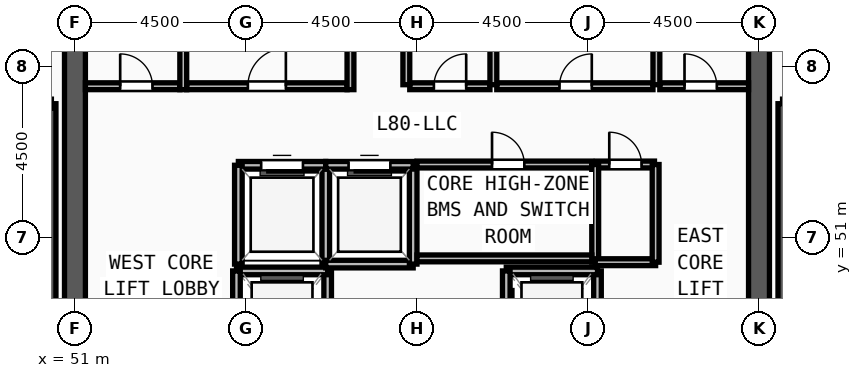
"""IFC4 building model, lengths in metres.
Left out: names, types, materials, properties, quantities, classifications, styles, units other than length and angle.
Written with IfcOpenShell. Run it as: python <this file> out.ifc"""

import sys

from ifc_helpers import new_model, si_unit, direction, frame, frame_2d, origin, place, context, subcontext, project, spatial, rectangle, extrude, source, transform, mapped, element, fill, save


model = new_model("IFC4")
c1 = context("Model", 3, precision=1e-05, world=origin(), true_north=direction((0.0, 1.0)))
c2 = subcontext(c1, "Body", "Model", "MODEL_VIEW")
j1 = project(units=[si_unit("LENGTHUNIT", "METRE"), si_unit("PLANEANGLEUNIT", "RADIAN")], contexts=[c1])
p1 = place(None, origin())
s1 = spatial("IfcSite", under=j1, at=p1, CompositionType="ELEMENT")
p2 = place(p1, origin())
s2 = spatial("IfcBuilding", under=s1, at=p2, CompositionType="ELEMENT")
p3 = place(p2, frame((0.0, 0.0, 309.0)))
s3 = spatial("IfcBuildingStorey", under=s2, at=p3, CompositionType="ELEMENT", Elevation=309.0)
p4 = place(p3, frame((69.0, 60.9, 0.0), z_axis=(0.0, 0.0, 1.0), x_axis=(0.0, -1.0, 0.0)))
e1 = element("IfcWall", 1, at=p4, inside=s3, PredefinedType="SHEAR", context=c2, shape_type="SweptSolid", body=[
    extrude(rectangle(XDim=13.8, YDim=0.55, at=frame_2d((6.9, 0.0))), origin(), (0.0, 0.0, 1.0), 3.57),
])
m1 = source(origin(), c2, "Body", "SweptSolid", [
    extrude(rectangle(XDim=1.2, YDim=2.2, at=frame_2d((0.6, 1.1))), frame((0.0, 0.285, 0.0), z_axis=(0.0, -1.0, 0.0), x_axis=(1.0, 0.0, 0.0)), (0.0, 0.0, 1.0), 0.57),
])
p5 = place(p4, frame((1.35, 0.0, 0.0)))
e2 = element("IfcOpeningElement", 2, at=p5, cuts=e1, PredefinedType="OPENING", context=c2, shape_type="MappedRepresentation", body=[
    mapped(m1, transform((0.0, 0.0, 0.0), x_axis=(1.0, 0.0, 0.0), y_axis=(0.0, 1.0, 0.0), z_axis=(0.0, 0.0, 1.0), scale=1.0)),
])
p6 = place(p3, frame((51.0, 47.1, 0.0), z_axis=(0.0, 0.0, 1.0), x_axis=(0.0, 1.0, 0.0)))
e3 = element("IfcWall", 3, at=p6, inside=s3, PredefinedType="SHEAR", context=c2, shape_type="SweptSolid", body=[
    extrude(rectangle(XDim=13.8, YDim=0.55, at=frame_2d((6.9, 0.0))), origin(), (0.0, 0.0, 1.0), 3.57),
])
for number, where, z_axis, x_axis in (
    (4, (50.38, 46.7, 0.0), (0.0, 0.0, 1.0), (0.0, 1.0, 0.0)),
    (5, (69.62, 54.52, 0.0), (0.0, 0.0, 1.0), (0.0, -1.0, 0.0)),
):
    element("IfcWall", number, at=place(p3, frame(where, z_axis=z_axis, x_axis=x_axis)), inside=s3, PredefinedType="SOLIDWALL", context=c2, shape_type="SweptSolid", body=[
        extrude(rectangle(XDim=7.82, YDim=0.24, at=frame_2d((3.91, 0.0))), origin(), (0.0, 0.0, 1.0), 3.57),
    ])
p7 = place(p3, frame((57.65, 47.12, 0.0), z_axis=(0.0, 0.0, 1.0), x_axis=(0.0, 1.0, 0.0)))
e6 = element("IfcWall", 6, at=p7, inside=s3, PredefinedType="SOLIDWALL", context=c2, shape_type="SweptSolid", body=[
    extrude(rectangle(XDim=3.0, YDim=0.2, at=frame_2d((1.5, 0.0))), origin(), (0.0, 0.0, 1.0), 3.57),
])
m2 = source(origin(), c2, "Body", "SweptSolid", [
    extrude(rectangle(XDim=1.2, YDim=2.3, at=frame_2d((0.6, 1.15))), frame((0.0, 0.11, 0.0), z_axis=(0.0, -1.0, 0.0), x_axis=(1.0, 0.0, 0.0)), (0.0, 0.0, 1.0), 0.22),
])
p8 = place(p7, frame((0.9, 0.0, 0.0)))
e7 = element("IfcOpeningElement", 7, at=p8, cuts=e6, PredefinedType="OPENING", context=c2, shape_type="MappedRepresentation", body=[
    mapped(m2, transform((0.0, 0.0, 0.0), x_axis=(1.0, 0.0, 0.0), y_axis=(0.0, 1.0, 0.0), z_axis=(0.0, 0.0, 1.0), scale=1.0)),
])
p9 = place(p3, frame((57.65, 50.12, 0.0), z_axis=(0.0, 0.0, 1.0), x_axis=(-1.0, 0.0, 0.0)))
e8 = element("IfcWall", 8, at=p9, inside=s3, PredefinedType="SOLIDWALL", context=c2, shape_type="SweptSolid", body=[
    extrude(rectangle(XDim=2.4, YDim=0.2, at=frame_2d((1.2, 0.0))), origin(), (0.0, 0.0, 1.0), 3.57),
])
for number, where, z_axis, x_axis in (
    (9, (55.25, 50.12, 0.0), (0.0, 0.0, 1.0), (0.0, -1.0, 0.0)),
    (10, (64.75, 47.12, 0.0), (0.0, 0.0, 1.0), (0.0, 1.0, 0.0)),
):
    element("IfcWall", number, at=place(p3, frame(where, z_axis=z_axis, x_axis=x_axis)), inside=s3, PredefinedType="SOLIDWALL", context=c2, shape_type="SweptSolid", body=[
        extrude(rectangle(XDim=3.0, YDim=0.2, at=frame_2d((1.5, 0.0))), origin(), (0.0, 0.0, 1.0), 3.57),
    ])
p10 = place(p3, frame((64.75, 50.12, 0.0), z_axis=(0.0, 0.0, 1.0), x_axis=(-1.0, 0.0, 0.0)))
e11 = element("IfcWall", 11, at=p10, inside=s3, PredefinedType="SOLIDWALL", context=c2, shape_type="SweptSolid", body=[
    extrude(rectangle(XDim=2.4, YDim=0.2, at=frame_2d((1.2, 0.0))), origin(), (0.0, 0.0, 1.0), 3.57),
])
p11 = place(p3, frame((62.35, 50.12, 0.0), z_axis=(0.0, 0.0, 1.0), x_axis=(0.0, -1.0, 0.0)))
e12 = element("IfcWall", 12, at=p11, inside=s3, PredefinedType="SOLIDWALL", context=c2, shape_type="SweptSolid", body=[
    extrude(rectangle(XDim=3.0, YDim=0.2, at=frame_2d((1.5, 0.0))), origin(), (0.0, 0.0, 1.0), 3.57),
])
p12 = place(p11, frame((0.9, 0.0, 0.0)))
e13 = element("IfcOpeningElement", 13, at=p12, cuts=e12, PredefinedType="OPENING", context=c2, shape_type="MappedRepresentation", body=[
    mapped(m2, transform((0.0, 0.0, 0.0), x_axis=(1.0, 0.0, 0.0), y_axis=(0.0, 1.0, 0.0), z_axis=(0.0, 0.0, 1.0), scale=1.0)),
])
p13 = place(p3, frame((57.6, 50.3, 0.0), z_axis=(0.0, 0.0, 1.0), x_axis=(0.0, 1.0, 0.0)))
e14 = element("IfcWall", 14, at=p13, inside=s3, PredefinedType="SOLIDWALL", context=c2, shape_type="SweptSolid", body=[
    extrude(rectangle(XDim=2.6, YDim=0.2, at=frame_2d((1.3, 0.0))), origin(), (0.0, 0.0, 1.0), 3.57),
])
p14 = place(p3, frame((57.6, 52.9, 0.0), z_axis=(0.0, 0.0, 1.0), x_axis=(-1.0, 0.0, 0.0)))
e15 = element("IfcWall", 15, at=p14, inside=s3, PredefinedType="SOLIDWALL", context=c2, shape_type="SweptSolid", body=[
    extrude(rectangle(XDim=2.3, YDim=0.2, at=frame_2d((1.15, 0.0))), origin(), (0.0, 0.0, 1.0), 3.57),
])
m3 = source(origin(), c2, "Body", "SweptSolid", [
    extrude(rectangle(XDim=1.1, YDim=2.2, at=frame_2d((0.55, 1.1))), frame((0.0, 0.11, 0.0), z_axis=(0.0, -1.0, 0.0), x_axis=(1.0, 0.0, 0.0)), (0.0, 0.0, 1.0), 0.22),
])
p15 = place(p14, frame((0.6, 0.0, 0.0)))
e16 = element("IfcOpeningElement", 16, at=p15, cuts=e15, PredefinedType="OPENING", context=c2, shape_type="MappedRepresentation", body=[
    mapped(m3, transform((0.0, 0.0, 0.0), x_axis=(1.0, 0.0, 0.0), y_axis=(0.0, 1.0, 0.0), z_axis=(0.0, 0.0, 1.0), scale=1.0)),
])
p16 = place(p3, frame((55.3, 52.9, 0.0), z_axis=(0.0, 0.0, 1.0), x_axis=(0.0, -1.0, 0.0)))
e17 = element("IfcWall", 17, at=p16, inside=s3, PredefinedType="SOLIDWALL", context=c2, shape_type="SweptSolid", body=[
    extrude(rectangle(XDim=2.6, YDim=0.2, at=frame_2d((1.3, 0.0))), origin(), (0.0, 0.0, 1.0), 3.57),
])
p17 = place(p3, frame((57.6, 50.3, 0.0), z_axis=(0.0, 0.0, 1.0), x_axis=(1.0, 0.0, 0.0)))
e18 = element("IfcWall", 18, at=p17, inside=s3, PredefinedType="SOLIDWALL", context=c2, shape_type="SweptSolid", body=[
    extrude(rectangle(XDim=2.3, YDim=0.2, at=frame_2d((1.15, 0.0))), origin(), (0.0, 0.0, 1.0), 3.57),
])
p18 = place(p3, frame((59.9, 50.3, 0.0), z_axis=(0.0, 0.0, 1.0), x_axis=(0.0, 1.0, 0.0)))
e19 = element("IfcWall", 19, at=p18, inside=s3, PredefinedType="SOLIDWALL", context=c2, shape_type="SweptSolid", body=[
    extrude(rectangle(XDim=2.6, YDim=0.2, at=frame_2d((1.3, 0.0))), origin(), (0.0, 0.0, 1.0), 3.57),
])
p19 = place(p3, frame((59.9, 52.9, 0.0), z_axis=(0.0, 0.0, 1.0), x_axis=(-1.0, 0.0, 0.0)))
e20 = element("IfcWall", 20, at=p19, inside=s3, PredefinedType="SOLIDWALL", context=c2, shape_type="SweptSolid", body=[
    extrude(rectangle(XDim=2.3, YDim=0.2, at=frame_2d((1.15, 0.0))), origin(), (0.0, 0.0, 1.0), 3.57),
])
p20 = place(p19, frame((0.6, 0.0, 0.0)))
e21 = element("IfcOpeningElement", 21, at=p20, cuts=e20, PredefinedType="OPENING", context=c2, shape_type="MappedRepresentation", body=[
    mapped(m3, transform((0.0, 0.0, 0.0), x_axis=(1.0, 0.0, 0.0), y_axis=(0.0, 1.0, 0.0), z_axis=(0.0, 0.0, 1.0), scale=1.0)),
])
p21 = place(p3, frame((60.0, 52.92, 0.0), z_axis=(0.0, 0.0, 1.0), x_axis=(1.0, 0.0, 0.0)))
e22 = element("IfcWall", 22, at=p21, inside=s3, PredefinedType="PARTITIONING", context=c2, shape_type="SweptSolid", body=[
    extrude(rectangle(XDim=4.6, YDim=0.18, at=frame_2d((2.3, 0.0))), origin(), (0.0, 0.0, 1.0), 3.57),
])
m4 = source(origin(), c2, "Body", "SweptSolid", [
    extrude(rectangle(XDim=0.85, YDim=2.1, at=frame_2d((0.425, 1.05))), frame((0.0, 0.1, 0.0), z_axis=(0.0, -1.0, 0.0), x_axis=(1.0, 0.0, 0.0)), (0.0, 0.0, 1.0), 0.2),
])
p22 = place(p21, frame((1.975, 0.0, 0.0)))
e23 = element("IfcOpeningElement", 23, at=p22, cuts=e22, PredefinedType="OPENING", context=c2, shape_type="MappedRepresentation", body=[
    mapped(m4, transform((0.0, 0.0, 0.0), x_axis=(1.0, 0.0, 0.0), y_axis=(0.0, 1.0, 0.0), z_axis=(0.0, 0.0, 1.0), scale=1.0)),
])
p23 = place(p3, frame((53.94, 54.98, 0.0), z_axis=(0.0, 0.0, 1.0), x_axis=(1.0, 0.0, 0.0)))
e24 = element("IfcWall", 24, at=p23, inside=s3, PredefinedType="PARTITIONING", context=c2, shape_type="SweptSolid", body=[
    extrude(rectangle(XDim=4.22, YDim=0.18, at=frame_2d((2.11, 0.0))), origin(), (0.0, 0.0, 1.0), 3.57),
])
m5 = source(origin(), c2, "Body", "SweptSolid", [
    extrude(rectangle(XDim=1.0, YDim=2.2, at=frame_2d((0.5, 1.1))), frame((0.0, 0.1, 0.0), z_axis=(0.0, -1.0, 0.0), x_axis=(1.0, 0.0, 0.0)), (0.0, 0.0, 1.0), 0.2),
])
p24 = place(p23, frame((1.61, 0.0, 0.0)))
e25 = element("IfcOpeningElement", 25, at=p24, cuts=e24, PredefinedType="OPENING", context=c2, shape_type="MappedRepresentation", body=[
    mapped(m5, transform((0.0, 0.0, 0.0), x_axis=(1.0, 0.0, 0.0), y_axis=(0.0, 1.0, 0.0), z_axis=(0.0, 0.0, 1.0), scale=1.0)),
])
p25 = place(p3, frame((51.275, 54.98, 0.0), z_axis=(0.0, 0.0, 1.0), x_axis=(1.0, 0.0, 0.0)))
e26 = element("IfcWall", 26, at=p25, inside=s3, PredefinedType="PARTITIONING", context=c2, shape_type="SweptSolid", body=[
    extrude(rectangle(XDim=2.485, YDim=0.18, at=frame_2d((1.243, 0.0))), origin(), (0.0, 0.0, 1.0), 3.57),
])
p26 = place(p25, frame((0.915, 0.0, 0.0)))
e27 = element("IfcOpeningElement", 27, at=p26, cuts=e26, PredefinedType="OPENING", context=c2, shape_type="MappedRepresentation", body=[
    mapped(m4, transform((0.0, 0.0, 0.0), x_axis=(1.0, 0.0, 0.0), y_axis=(0.0, 1.0, 0.0), z_axis=(0.0, 0.0, 1.0), scale=1.0)),
])
p27 = place(p3, frame((62.1, 54.98, 0.0), z_axis=(0.0, 0.0, 1.0), x_axis=(1.0, 0.0, 0.0)))
e28 = element("IfcWall", 28, at=p27, inside=s3, PredefinedType="PARTITIONING", context=c2, shape_type="SweptSolid", body=[
    extrude(rectangle(XDim=4.11, YDim=0.18, at=frame_2d((2.055, 0.0))), origin(), (0.0, 0.0, 1.0), 3.57),
])
p28 = place(p27, frame((1.65, 0.0, 0.0)))
e29 = element("IfcOpeningElement", 29, at=p28, cuts=e28, PredefinedType="OPENING", context=c2, shape_type="MappedRepresentation", body=[
    mapped(m4, transform((0.0, 0.0, 0.0), x_axis=(1.0, 0.0, 0.0), y_axis=(0.0, 1.0, 0.0), z_axis=(0.0, 0.0, 1.0), scale=1.0)),
])
p29 = place(p3, frame((66.39, 54.98, 0.0), z_axis=(0.0, 0.0, 1.0), x_axis=(1.0, 0.0, 0.0)))
e30 = element("IfcWall", 30, at=p29, inside=s3, PredefinedType="PARTITIONING", context=c2, shape_type="SweptSolid", body=[
    extrude(rectangle(XDim=2.335, YDim=0.18, at=frame_2d((1.167, 0.0))), origin(), (0.0, 0.0, 1.0), 3.57),
])
p30 = place(p29, frame((0.65, 0.0, 0.0)))
e31 = element("IfcOpeningElement", 31, at=p30, cuts=e30, PredefinedType="OPENING", context=c2, shape_type="MappedRepresentation", body=[
    mapped(m4, transform((0.0, 0.0, 0.0), x_axis=(1.0, 0.0, 0.0), y_axis=(0.0, 1.0, 0.0), z_axis=(0.0, 0.0, 1.0), scale=1.0)),
])
p31 = place(p3, frame((59.81, 54.98, 0.0), z_axis=(0.0, 0.0, 1.0), x_axis=(1.0, 0.0, 0.0)))
e32 = element("IfcWall", 32, at=p31, inside=s3, PredefinedType="PARTITIONING", context=c2, shape_type="SweptSolid", body=[
    extrude(rectangle(XDim=2.11, YDim=0.18, at=frame_2d((1.055, 0.0))), origin(), (0.0, 0.0, 1.0), 3.57),
])
p32 = place(p31, frame((0.635, 0.0, 0.0)))
e33 = element("IfcOpeningElement", 33, at=p32, cuts=e32, PredefinedType="OPENING", context=c2, shape_type="MappedRepresentation", body=[
    mapped(m4, transform((0.0, 0.0, 0.0), x_axis=(1.0, 0.0, 0.0), y_axis=(0.0, 1.0, 0.0), z_axis=(0.0, 0.0, 1.0), scale=1.0)),
])
p33 = place(p3, frame((64.72, 52.92, 0.0), z_axis=(0.0, 0.0, 1.0), x_axis=(1.0, 0.0, 0.0)))
e34 = element("IfcWall", 34, at=p33, inside=s3, PredefinedType="PARTITIONING", context=c2, shape_type="SweptSolid", body=[
    extrude(rectangle(XDim=1.53, YDim=0.18, at=frame_2d((0.765, 0.0))), origin(), (0.0, 0.0, 1.0), 3.57),
])
p34 = place(p33, frame((0.34, 0.0, 0.0)))
e35 = element("IfcOpeningElement", 35, at=p34, cuts=e34, PredefinedType="OPENING", context=c2, shape_type="MappedRepresentation", body=[
    mapped(m4, transform((0.0, 0.0, 0.0), x_axis=(1.0, 0.0, 0.0), y_axis=(0.0, 1.0, 0.0), z_axis=(0.0, 0.0, 1.0), scale=1.0)),
])
p35 = place(p3, frame((66.3, 55.02, 0.0), z_axis=(0.0, 0.0, 1.0), x_axis=(0.0, 1.0, 0.0)))
e36 = element("IfcWall", 36, at=p35, inside=s3, PredefinedType="PARTITIONING", context=c2, shape_type="SweptSolid", body=[
    extrude(rectangle(XDim=2.86, YDim=0.18, at=frame_2d((1.43, 0.0))), origin(), (0.0, 0.0, 1.0), 3.57),
])
for number, where, z_axis, x_axis in (
    (37, (59.72, 55.02, 0.0), (0.0, 0.0, 1.0), (0.0, 1.0, 0.0)),
    (38, (62.01, 55.02, 0.0), (0.0, 0.0, 1.0), (0.0, 1.0, 0.0)),
):
    element("IfcWall", number, at=place(p3, frame(where, z_axis=z_axis, x_axis=x_axis)), inside=s3, PredefinedType="PARTITIONING", context=c2, shape_type="SweptSolid", body=[
        extrude(rectangle(XDim=1.73, YDim=0.18, at=frame_2d((0.865, 0.0))), origin(), (0.0, 0.0, 1.0), 3.57),
    ])
p36 = place(p3, frame((64.69, 50.35, 0.0), z_axis=(0.0, 0.0, 1.0), x_axis=(0.0, 1.0, 0.0)))
e39 = element("IfcWall", 39, at=p36, inside=s3, PredefinedType="PARTITIONING", context=c2, shape_type="SweptSolid", body=[
    extrude(rectangle(XDim=2.57, YDim=0.18, at=frame_2d((1.285, 0.0))), origin(), (0.0, 0.0, 1.0), 3.57),
])
p37 = place(p3, frame((64.69, 50.35, 0.0), z_axis=(0.0, 0.0, 1.0), x_axis=(1.0, 0.0, 0.0)))
e40 = element("IfcWall", 40, at=p37, inside=s3, PredefinedType="PARTITIONING", context=c2, shape_type="SweptSolid", body=[
    extrude(rectangle(XDim=1.59, YDim=0.18, at=frame_2d((0.795, 0.0))), origin(), (0.0, 0.0, 1.0), 3.57),
])
p38 = place(p3, frame((66.28, 50.35, 0.0), z_axis=(0.0, 0.0, 1.0), x_axis=(0.0, 1.0, 0.0)))
e41 = element("IfcWall", 41, at=p38, inside=s3, PredefinedType="PARTITIONING", context=c2, shape_type="SweptSolid", body=[
    extrude(rectangle(XDim=2.57, YDim=0.18, at=frame_2d((1.285, 0.0))), origin(), (0.0, 0.0, 1.0), 3.57),
])
p39 = place(p3, frame((60.0, 50.45, 0.0), z_axis=(0.0, 0.0, 1.0), x_axis=(1.0, 0.0, 0.0)))
e42 = element("IfcWall", 42, at=p39, inside=s3, PredefinedType="PARTITIONING", context=c2, shape_type="SweptSolid", body=[
    extrude(rectangle(XDim=4.6, YDim=0.18, at=frame_2d((2.3, 0.0))), origin(), (0.0, 0.0, 1.0), 3.57),
])
for number, where, z_axis, x_axis in (
    (43, (53.85, 54.89, 0.0), (0.0, 0.0, 1.0), (0.0, 1.0, 0.0)),
    (44, (58.25, 54.89, 0.0), (0.0, 0.0, 1.0), (0.0, 1.0, 0.0)),
):
    element("IfcWall", number, at=place(p3, frame(where, z_axis=z_axis, x_axis=x_axis)), inside=s3, PredefinedType="PARTITIONING", context=c2, shape_type="SweptSolid", body=[
        extrude(rectangle(XDim=2.78, YDim=0.18, at=frame_2d((1.39, 0.0))), origin(), (0.0, 0.0, 1.0), 3.57),
    ])
m6 = source(origin(), c2, "Body", "SweptSolid", [
    extrude(rectangle(XDim=1.1, YDim=2.2, at=frame_2d((0.55, 1.1))), frame((0.0, 0.025, 0.0), z_axis=(0.0, -1.0, 0.0), x_axis=(1.0, 0.0, 0.0)), (0.0, 0.0, 1.0), 0.05),
])
p40 = place(p15, origin())
e45 = element("IfcDoor", 45, at=p40, inside=s3, OperationType="SLIDING_TO_LEFT", PredefinedType="DOOR", context=c2, shape_type="MappedRepresentation", body=[
    mapped(m6, transform((0.0, 0.0, 0.0), x_axis=(1.0, 0.0, 0.0), y_axis=(0.0, 1.0, 0.0), z_axis=(0.0, 0.0, 1.0), scale=1.0)),
])
fill(e16, e45)
p41 = place(p20, origin())
e46 = element("IfcDoor", 46, at=p41, inside=s3, OperationType="SLIDING_TO_LEFT", PredefinedType="DOOR", context=c2, shape_type="MappedRepresentation", body=[
    mapped(m6, transform((0.0, 0.0, 0.0), x_axis=(1.0, 0.0, 0.0), y_axis=(0.0, 1.0, 0.0), z_axis=(0.0, 0.0, 1.0), scale=1.0)),
])
fill(e21, e46)
m7 = source(origin(), c2, "Body", "SweptSolid", [
    extrude(rectangle(XDim=0.85, YDim=2.1, at=frame_2d((0.425, 1.05))), frame((0.0, 0.025, 0.0), z_axis=(0.0, -1.0, 0.0), x_axis=(1.0, 0.0, 0.0)), (0.0, 0.0, 1.0), 0.05),
])
p42 = place(p22, origin())
e47 = element("IfcDoor", 47, at=p42, inside=s3, OperationType="SINGLE_SWING_LEFT", PredefinedType="DOOR", context=c2, shape_type="MappedRepresentation", body=[
    mapped(m7, transform((0.0, 0.0, 0.0), x_axis=(1.0, 0.0, 0.0), y_axis=(0.0, 1.0, 0.0), z_axis=(0.0, 0.0, 1.0), scale=1.0)),
])
fill(e23, e47)
m8 = source(origin(), c2, "Body", "SweptSolid", [
    extrude(rectangle(XDim=1.0, YDim=2.2, at=frame_2d((0.5, 1.1))), frame((0.0, 0.025, 0.0), z_axis=(0.0, -1.0, 0.0), x_axis=(1.0, 0.0, 0.0)), (0.0, 0.0, 1.0), 0.05),
])
p43 = place(p24, origin())
e48 = element("IfcDoor", 48, at=p43, inside=s3, OperationType="SINGLE_SWING_RIGHT", PredefinedType="DOOR", context=c2, shape_type="MappedRepresentation", body=[
    mapped(m8, transform((0.0, 0.0, 0.0), x_axis=(1.0, 0.0, 0.0), y_axis=(0.0, 1.0, 0.0), z_axis=(0.0, 0.0, 1.0), scale=1.0)),
])
fill(e25, e48)
p44 = place(p26, origin())
e49 = element("IfcDoor", 49, at=p44, inside=s3, OperationType="SINGLE_SWING_LEFT", PredefinedType="DOOR", context=c2, shape_type="MappedRepresentation", body=[
    mapped(m7, transform((0.0, 0.0, 0.0), x_axis=(1.0, 0.0, 0.0), y_axis=(0.0, 1.0, 0.0), z_axis=(0.0, 0.0, 1.0), scale=1.0)),
])
fill(e27, e49)
p45 = place(p28, origin())
e50 = element("IfcDoor", 50, at=p45, inside=s3, OperationType="SINGLE_SWING_RIGHT", PredefinedType="DOOR", context=c2, shape_type="MappedRepresentation", body=[
    mapped(m7, transform((0.0, 0.0, 0.0), x_axis=(1.0, 0.0, 0.0), y_axis=(0.0, 1.0, 0.0), z_axis=(0.0, 0.0, 1.0), scale=1.0)),
])
fill(e29, e50)
p46 = place(p30, origin())
e51 = element("IfcDoor", 51, at=p46, inside=s3, OperationType="SINGLE_SWING_LEFT", PredefinedType="DOOR", context=c2, shape_type="MappedRepresentation", body=[
    mapped(m7, transform((0.0, 0.0, 0.0), x_axis=(1.0, 0.0, 0.0), y_axis=(0.0, 1.0, 0.0), z_axis=(0.0, 0.0, 1.0), scale=1.0)),
])
fill(e31, e51)
p47 = place(p32, origin())
e52 = element("IfcDoor", 52, at=p47, inside=s3, OperationType="SINGLE_SWING_RIGHT", PredefinedType="DOOR", context=c2, shape_type="MappedRepresentation", body=[
    mapped(m7, transform((0.0, 0.0, 0.0), x_axis=(1.0, 0.0, 0.0), y_axis=(0.0, 1.0, 0.0), z_axis=(0.0, 0.0, 1.0), scale=1.0)),
])
fill(e33, e52)
p48 = place(p34, origin())
e53 = element("IfcDoor", 53, at=p48, inside=s3, OperationType="SINGLE_SWING_LEFT", PredefinedType="DOOR", context=c2, shape_type="MappedRepresentation", body=[
    mapped(m7, transform((0.0, 0.0, 0.0), x_axis=(1.0, 0.0, 0.0), y_axis=(0.0, 1.0, 0.0), z_axis=(0.0, 0.0, 1.0), scale=1.0)),
])
fill(e35, e53)
save(model, sys.argv[1])
